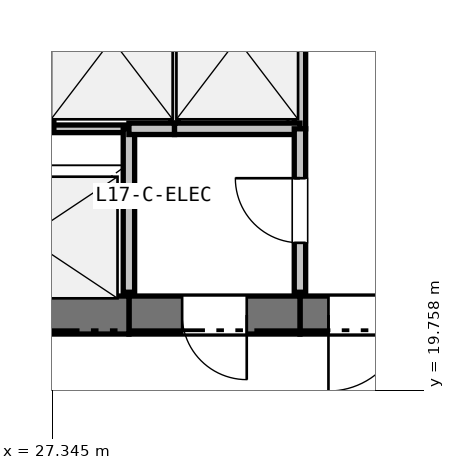
"""IFC4 building model, lengths in metres.
Left out: names, types, materials, properties, quantities, classifications, styles, units other than length and angle.
Written with IfcOpenShell. Run it as: python <this file> out.ifc"""

import sys

from ifc_helpers import new_model, si_unit, direction, frame, frame_2d, origin, place, context, subcontext, project, spatial, rectangle, extrude, element, fill, save


model = new_model("IFC4")
c1 = context("Model", 3, precision=1e-05, world=origin(), true_north=direction((0.0, 1.0)))
c2 = subcontext(c1, "Body", "Model", "MODEL_VIEW")
j1 = project(units=[si_unit("LENGTHUNIT", "METRE"), si_unit("PLANEANGLEUNIT", "RADIAN")], contexts=[c1])
p1 = place(None, origin())
s1 = spatial("IfcSite", under=j1, at=p1, CompositionType="ELEMENT")
p2 = place(p1, origin())
s2 = spatial("IfcBuilding", under=s1, at=p2, CompositionType="ELEMENT")
p3 = place(p2, frame((0.0, 0.0, 62.1)))
s3 = spatial("IfcBuildingStorey", under=s2, at=p3, CompositionType="ELEMENT", Elevation=62.1)
p4 = place(p3, frame((32.35, 20.75, 0.0), z_axis=(0.0, 0.0, 1.0), x_axis=(-1.0, 0.0, 0.0)))
e1 = element("IfcWall", 1, at=p4, inside=s3, PredefinedType="SHEAR", context=c2, shape_type="SweptSolid", body=[
    extrude(rectangle(XDim=1.75, YDim=0.5, at=frame_2d((0.875, 0.0))), origin(), (0.0, 0.0, 1.0), 4.48),
])
p5 = place(p4, frame((0.375, 0.0, 0.0)))
e2 = element("IfcOpeningElement", 2, at=p5, cuts=e1, PredefinedType="OPENING", context=c2, shape_type="SweptSolid", body=[
    extrude(rectangle(XDim=1.0, YDim=2.15, at=frame_2d((0.5, 1.075))), frame((0.0, 0.26, 0.0), z_axis=(0.0, -1.0, 0.0), x_axis=(1.0, 0.0, 0.0)), (0.0, 0.0, 1.0), 0.52),
])
p6 = place(p3, frame((30.6, 20.75, 0.0), z_axis=(0.0, 0.0, 1.0), x_axis=(-1.0, 0.0, 0.0)))
e3 = element("IfcWall", 3, at=p6, inside=s3, PredefinedType="SHEAR", context=c2, shape_type="SweptSolid", body=[
    extrude(rectangle(XDim=2.25, YDim=0.5, at=frame_2d((1.125, 0.0))), origin(), (0.0, 0.0, 1.0), 4.48),
])
p7 = place(p6, frame((0.7, 0.0, 0.0)))
e4 = element("IfcOpeningElement", 4, at=p7, cuts=e3, PredefinedType="OPENING", context=c2, shape_type="SweptSolid", body=[
    extrude(rectangle(XDim=0.85, YDim=2.1, at=frame_2d((0.425, 1.05))), frame((0.0, 0.26, 0.0), z_axis=(0.0, -1.0, 0.0), x_axis=(1.0, 0.0, 0.0)), (0.0, 0.0, 1.0), 0.52),
])
p8 = place(p3, frame((28.35, 20.75, 0.0), z_axis=(0.0, 0.0, 1.0), x_axis=(-1.0, 0.0, 0.0)))
e5 = element("IfcWall", 5, at=p8, inside=s3, PredefinedType="SHEAR", context=c2, shape_type="SweptSolid", body=[
    extrude(rectangle(XDim=2.7, YDim=0.5, at=frame_2d((1.35, 0.0))), origin(), (0.0, 0.0, 1.0), 4.48),
])
p9 = place(p3, frame((27.3, 23.2, 0.0), z_axis=(0.0, 0.0, 1.0), x_axis=(1.0, 0.0, 0.0)))
e6 = element("IfcWall", 6, at=p9, inside=s3, PredefinedType="PARTITIONING", context=c2, shape_type="SweptSolid", body=[
    extrude(rectangle(XDim=1.05, YDim=0.1, at=frame_2d((0.525, 0.0))), origin(), (0.0, 0.0, 1.0), 4.48),
])
p10 = place(p3, frame((28.35, 23.2, 0.0), z_axis=(0.0, 0.0, 1.0), x_axis=(0.0, -1.0, 0.0)))
e7 = element("IfcWall", 7, at=p10, inside=s3, PredefinedType="PARTITIONING", context=c2, shape_type="SweptSolid", body=[
    extrude(rectangle(XDim=2.15, YDim=0.15, at=frame_2d((1.075, 0.0))), origin(), (0.0, 0.0, 1.0), 4.48),
])
p11 = place(p3, frame((27.3, 25.4, 0.0), z_axis=(0.0, 0.0, 1.0), x_axis=(0.0, -1.0, 0.0)))
e8 = element("IfcWall", 8, at=p11, inside=s3, PredefinedType="PARTITIONING", context=c2, shape_type="SweptSolid", body=[
    extrude(rectangle(XDim=2.2, YDim=0.125, at=frame_2d((1.1, 0.0))), origin(), (0.0, 0.0, 1.0), 4.48),
])
p12 = place(p3, frame((28.95, 25.4, 0.0), z_axis=(0.0, 0.0, 1.0), x_axis=(0.0, -1.0, 0.0)))
e9 = element("IfcWall", 9, at=p12, inside=s3, PredefinedType="PARTITIONING", context=c2, shape_type="SweptSolid", body=[
    extrude(rectangle(XDim=2.2, YDim=0.1, at=frame_2d((1.1, 0.0))), origin(), (0.0, 0.0, 1.0), 4.48),
])
p13 = place(p3, frame((28.95, 23.2, 0.0), z_axis=(0.0, 0.0, 1.0), x_axis=(-1.0, 0.0, 0.0)))
e10 = element("IfcWall", 10, at=p13, inside=s3, PredefinedType="PARTITIONING", context=c2, shape_type="SweptSolid", body=[
    extrude(rectangle(XDim=0.6, YDim=0.15, at=frame_2d((0.3, 0.0))), origin(), (0.0, 0.0, 1.0), 4.48),
])
p14 = place(p3, frame((30.6, 25.4, 0.0), z_axis=(0.0, 0.0, 1.0), x_axis=(0.0, -1.0, 0.0)))
e11 = element("IfcWall", 11, at=p14, inside=s3, PredefinedType="PARTITIONING", context=c2, shape_type="SweptSolid", body=[
    extrude(rectangle(XDim=2.2, YDim=0.15, at=frame_2d((1.1, 0.0))), origin(), (0.0, 0.0, 1.0), 4.48),
])
p15 = place(p3, frame((30.6, 23.2, 0.0), z_axis=(0.0, 0.0, 1.0), x_axis=(-1.0, 0.0, 0.0)))
e12 = element("IfcWall", 12, at=p15, inside=s3, PredefinedType="PARTITIONING", context=c2, shape_type="SweptSolid", body=[
    extrude(rectangle(XDim=1.65, YDim=0.15, at=frame_2d((0.825, 0.0))), origin(), (0.0, 0.0, 1.0), 4.48),
])
p16 = place(p3, frame((30.6, 21.05, 0.0), z_axis=(0.0, 0.0, 1.0), x_axis=(0.0, 1.0, 0.0)))
e13 = element("IfcWall", 13, at=p16, inside=s3, PredefinedType="PARTITIONING", context=c2, shape_type="SweptSolid", body=[
    extrude(rectangle(XDim=2.15, YDim=0.15, at=frame_2d((1.075, 0.0))), origin(), (0.0, 0.0, 1.0), 4.48),
])
p17 = place(p16, frame((0.65, 0.0, 0.0)))
e14 = element("IfcOpeningElement", 14, at=p17, cuts=e13, PredefinedType="OPENING", context=c2, shape_type="SweptSolid", body=[
    extrude(rectangle(XDim=0.85, YDim=2.1, at=frame_2d((0.425, 1.05))), frame((0.0, 0.085, 0.0), z_axis=(0.0, -1.0, 0.0), x_axis=(1.0, 0.0, 0.0)), (0.0, 0.0, 1.0), 0.17),
])
p18 = place(p5, origin())
e15 = element("IfcDoor", 15, at=p18, inside=s3, OperationType="SINGLE_SWING_RIGHT", PredefinedType="DOOR", context=c2, shape_type="SweptSolid", body=[
    extrude(rectangle(XDim=1.0, YDim=2.15, at=frame_2d((0.5, 1.075))), frame((0.0, 0.025, 0.0), z_axis=(0.0, -1.0, 0.0), x_axis=(1.0, 0.0, 0.0)), (0.0, 0.0, 1.0), 0.05),
])
fill(e2, e15)
p19 = place(p17, origin())
e16 = element("IfcDoor", 16, at=p19, inside=s3, OperationType="SINGLE_SWING_RIGHT", PredefinedType="DOOR", context=c2, shape_type="SweptSolid", body=[
    extrude(rectangle(XDim=0.85, YDim=2.1, at=frame_2d((0.425, 1.05))), frame((0.0, 0.025, 0.0), z_axis=(0.0, -1.0, 0.0), x_axis=(1.0, 0.0, 0.0)), (0.0, 0.0, 1.0), 0.05),
])
fill(e14, e16)
p20 = place(p7, origin())
e17 = element("IfcDoor", 17, at=p20, inside=s3, OperationType="SINGLE_SWING_LEFT", PredefinedType="DOOR", context=c2, shape_type="SweptSolid", body=[
    extrude(rectangle(XDim=0.85, YDim=2.1, at=frame_2d((0.425, 1.05))), frame((0.0, 0.025, 0.0), z_axis=(0.0, -1.0, 0.0), x_axis=(1.0, 0.0, 0.0)), (0.0, 0.0, 1.0), 0.05),
])
fill(e4, e17)
save(model, sys.argv[1])
